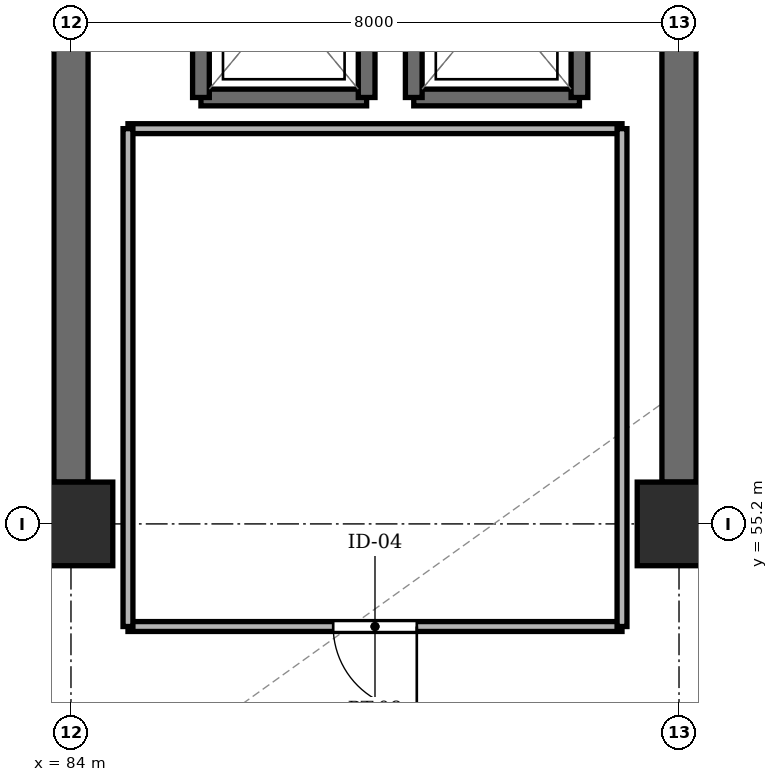
"""IFC4 building model, lengths in metres.
Left out: names, types, materials, properties, quantities, classifications, styles, units other than length and angle.
Written with IfcOpenShell. Run it as: python <this file> out.ifc"""

import sys

from ifc_helpers import new_model, si_unit, direction, frame, frame_2d, origin, origin_2d, place, context, subcontext, project, spatial, rectangle, extrude, element, fill, save


model = new_model("IFC4")
c1 = context("Model", 3, precision=1e-05, world=origin(), true_north=direction((0.0, 1.0)))
c2 = subcontext(c1, "Body", "Model", "MODEL_VIEW")
j1 = project(units=[si_unit("LENGTHUNIT", "METRE"), si_unit("PLANEANGLEUNIT", "RADIAN")], contexts=[c1])
p1 = place(None, origin())
s1 = spatial("IfcSite", under=j1, at=p1, CompositionType="ELEMENT")
p2 = place(p1, origin())
s2 = spatial("IfcBuilding", under=s1, at=p2, CompositionType="ELEMENT")
p3 = place(p2, frame((0.0, 0.0, 24.15)))
s3 = spatial("IfcBuildingStorey", under=s2, at=p3, CompositionType="ELEMENT", Elevation=24.15)
for number, where, z_axis, x_axis in (
    (1, (84.0, 55.2, -0.5), (0.0, 0.0, 1.0), (1.0, 0.0, 0.0)),
    (2, (92.0, 55.2, -0.5), (0.0, 0.0, 1.0), (1.0, 0.0, 0.0)),
):
    element("IfcColumn", number, at=place(p3, frame(where, z_axis=z_axis, x_axis=x_axis)), inside=s3, PredefinedType="COLUMN", context=c2, shape_type="SweptSolid", body=[
        extrude(rectangle(XDim=1.1, YDim=1.1, at=origin_2d()), origin(), (0.0, 0.0, 1.0), 3.64),
    ])
for number, where, z_axis, x_axis in (
    (3, (84.0, 55.75, 0.0), (0.0, 0.0, 1.0), (0.0, 1.0, 0.0)),
    (4, (92.0, 55.75, 0.0), (0.0, 0.0, 1.0), (0.0, 1.0, 0.0)),
):
    element("IfcWall", number, at=place(p3, frame(where, z_axis=z_axis, x_axis=x_axis)), inside=s3, PredefinedType="SHEAR", context=c2, shape_type="SweptSolid", body=[
        extrude(rectangle(XDim=6.2, YDim=0.45, at=frame_2d((3.1, 0.0))), origin(), (0.0, 0.0, 1.0), 3.14),
    ])
p4 = place(p3, frame((85.71, 60.81, 0.0), z_axis=(0.0, 0.0, 1.0), x_axis=(1.0, 0.0, 0.0)))
e5 = element("IfcWall", 5, at=p4, inside=s3, PredefinedType="SHEAR", context=c2, shape_type="SweptSolid", body=[
    extrude(rectangle(XDim=2.18, YDim=0.22, at=frame_2d((1.09, 0.0))), origin(), (0.0, 0.0, 1.0), 3.14),
])
for number, where, z_axis, x_axis in (
    (6, (85.71, 63.39, 0.0), (0.0, 0.0, 1.0), (0.0, -1.0, 0.0)),
    (7, (87.89, 60.81, 0.0), (0.0, 0.0, 1.0), (0.0, 1.0, 0.0)),
):
    element("IfcWall", number, at=place(p3, frame(where, z_axis=z_axis, x_axis=x_axis)), inside=s3, PredefinedType="SHEAR", context=c2, shape_type="SweptSolid", body=[
        extrude(rectangle(XDim=2.58, YDim=0.22, at=frame_2d((1.29, 0.0))), origin(), (0.0, 0.0, 1.0), 3.14),
    ])
p5 = place(p3, frame((88.51, 60.81, 0.0), z_axis=(0.0, 0.0, 1.0), x_axis=(1.0, 0.0, 0.0)))
e8 = element("IfcWall", 8, at=p5, inside=s3, PredefinedType="SHEAR", context=c2, shape_type="SweptSolid", body=[
    extrude(rectangle(XDim=2.18, YDim=0.22, at=frame_2d((1.09, 0.0))), origin(), (0.0, 0.0, 1.0), 3.14),
])
for number, where, z_axis, x_axis in (
    (9, (88.51, 63.39, 0.0), (0.0, 0.0, 1.0), (0.0, -1.0, 0.0)),
    (10, (90.69, 60.81, 0.0), (0.0, 0.0, 1.0), (0.0, 1.0, 0.0)),
):
    element("IfcWall", number, at=place(p3, frame(where, z_axis=z_axis, x_axis=x_axis)), inside=s3, PredefinedType="SHEAR", context=c2, shape_type="SweptSolid", body=[
        extrude(rectangle(XDim=2.58, YDim=0.22, at=frame_2d((1.29, 0.0))), origin(), (0.0, 0.0, 1.0), 3.14),
    ])
p6 = place(p3, frame((84.75, 53.85, 0.0), z_axis=(0.0, 0.0, 1.0), x_axis=(1.0, 0.0, 0.0)))
e11 = element("IfcWall", 11, at=p6, inside=s3, PredefinedType="PARTITIONING", context=c2, shape_type="SweptSolid", body=[
    extrude(rectangle(XDim=6.5, YDim=0.13, at=frame_2d((3.25, 0.0))), origin(), (0.0, 0.0, 1.0), 2.68),
])
p7 = place(p6, frame((2.7, 0.0, 0.0)))
e12 = element("IfcOpeningElement", 12, at=p7, cuts=e11, PredefinedType="OPENING", context=c2, shape_type="SweptSolid", body=[
    extrude(rectangle(XDim=1.1, YDim=2.15, at=frame_2d((0.55, 1.075))), frame((0.0, 0.077, 0.0), z_axis=(0.0, -1.0, 0.0), x_axis=(1.0, 0.0, 0.0)), (0.0, 0.0, 1.0), 0.154),
])
p8 = place(p3, frame((84.75, 60.4, 0.0), z_axis=(0.0, 0.0, 1.0), x_axis=(1.0, 0.0, 0.0)))
e13 = element("IfcWall", 13, at=p8, inside=s3, PredefinedType="PARTITIONING", context=c2, shape_type="SweptSolid", body=[
    extrude(rectangle(XDim=6.5, YDim=0.13, at=frame_2d((3.25, 0.0))), origin(), (0.0, 0.0, 1.0), 2.68),
])
for number, where, z_axis, x_axis in (
    (14, (84.75, 53.85, 0.0), (0.0, 0.0, 1.0), (0.0, 1.0, 0.0)),
    (15, (91.25, 53.85, 0.0), (0.0, 0.0, 1.0), (0.0, 1.0, 0.0)),
):
    element("IfcWall", number, at=place(p3, frame(where, z_axis=z_axis, x_axis=x_axis)), inside=s3, PredefinedType="PARTITIONING", context=c2, shape_type="SweptSolid", body=[
        extrude(rectangle(XDim=6.55, YDim=0.13, at=frame_2d((3.275, 0.0))), origin(), (0.0, 0.0, 1.0), 2.68),
    ])
p9 = place(p7, frame((1.1, 0.0, 0.0), z_axis=(0.0, 0.0, 1.0), x_axis=(-1.0, 0.0, 0.0)))
e16 = element("IfcDoor", 16, at=p9, inside=s3, OperationType="SINGLE_SWING_RIGHT", PredefinedType="DOOR", context=c2, shape_type="SweptSolid", body=[
    extrude(rectangle(XDim=1.1, YDim=2.15, at=frame_2d((0.55, 1.075))), frame((0.0, 0.025, 0.0), z_axis=(0.0, -1.0, 0.0), x_axis=(1.0, 0.0, 0.0)), (0.0, 0.0, 1.0), 0.05),
])
fill(e12, e16)
save(model, sys.argv[1])
